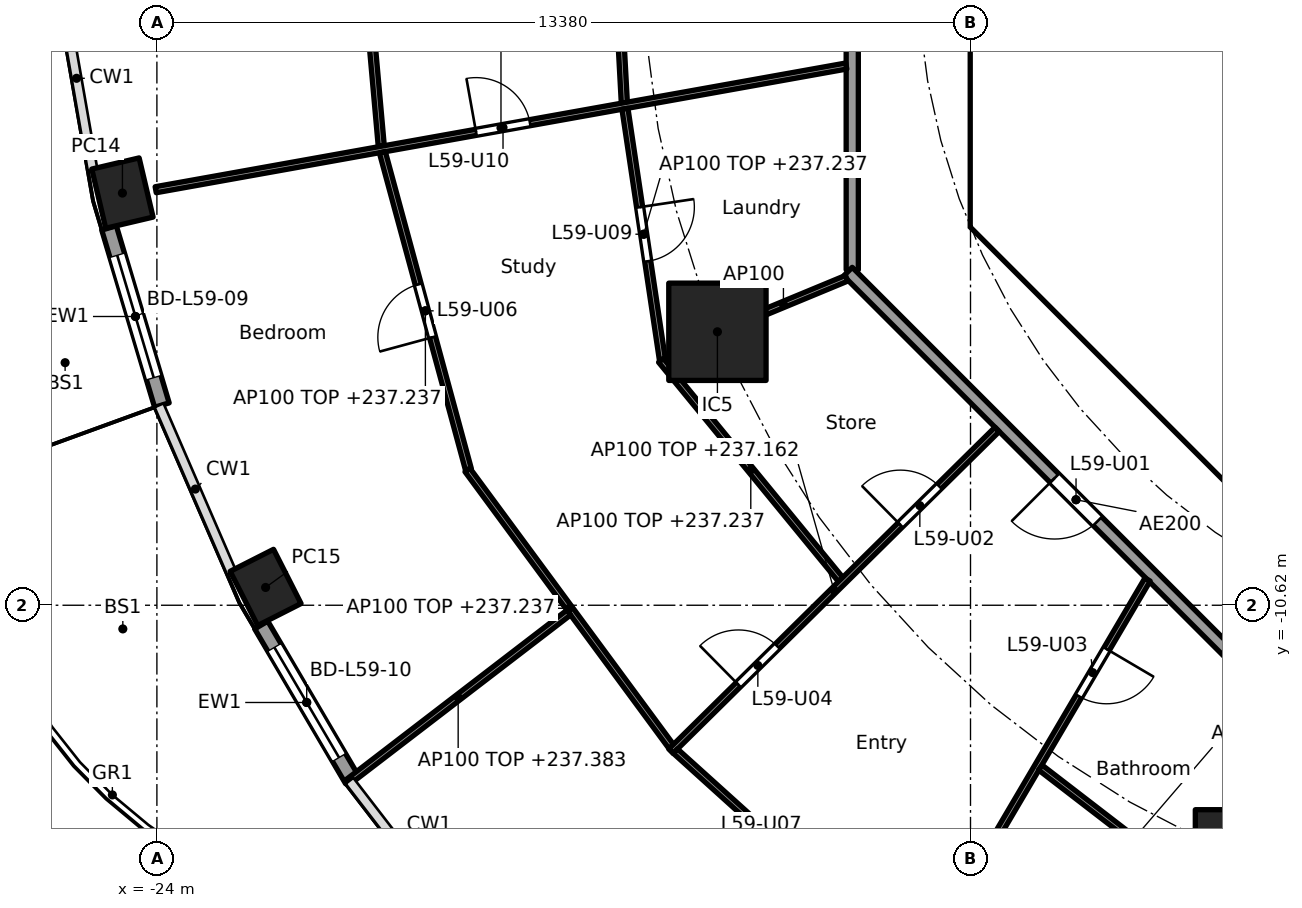
"""IFC4 building model, lengths in metres.
Left out: names, types, materials, properties, quantities, classifications, styles, units other than length and angle.
Written with IfcOpenShell. Run it as: python <this file> out.ifc"""

import sys

from ifc_helpers import new_model, si_unit, direction, frame, frame_2d, origin, origin_2d, place, context, subcontext, project, spatial, polyline, rectangle, hollow_rectangle, outline, extrude, element, fill, save


model = new_model("IFC4")
c1 = context("Model", 3, precision=1e-05, world=origin(), true_north=direction((0.0, 1.0)))
c2 = subcontext(c1, "Body", "Model", "MODEL_VIEW")
j1 = project(units=[si_unit("LENGTHUNIT", "METRE"), si_unit("PLANEANGLEUNIT", "RADIAN")], contexts=[c1])
p1 = place(None, origin())
s1 = spatial("IfcSite", under=j1, at=p1, CompositionType="ELEMENT")
p2 = place(p1, origin())
s2 = spatial("IfcBuilding", under=s1, at=p2, CompositionType="ELEMENT")
p3 = place(p2, frame((0.0, 0.0, 234.4)))
s3 = spatial("IfcBuildingStorey", under=s2, at=p3, CompositionType="ELEMENT", Elevation=234.4)
for number, where, z_axis, x_axis in (
    (1, (-24.567, -3.842, 0.0), (0.0, 0.0, 1.0), (0.229, -0.973, 0.0)),
    (2, (-22.212, -10.327, 0.0), (0.0, 0.0, 1.0), (0.452, -0.892, 0.0)),
):
    element("IfcColumn", number, at=place(p3, frame(where, z_axis=z_axis, x_axis=x_axis)), inside=s3, PredefinedType="COLUMN", context=c2, shape_type="SweptSolid", body=[
        extrude(hollow_rectangle(XDim=1.0, YDim=0.8, WallThickness=0.032, at=origin_2d()), origin(), (0.0, 0.0, 1.0), 3.7),
    ])
for number, where, z_axis, x_axis in (
    (3, (-14.782, -6.123, 0.0), (0.0, 0.0, 1.0), (1.0, 0.0, 0.0)),
    (4, (-6.123, -14.782, 0.0), (0.0, 0.0, 1.0), (1.0, 0.0, 0.0)),
):
    element("IfcColumn", number, at=place(p3, frame(where, z_axis=z_axis, x_axis=x_axis)), inside=s3, PredefinedType="COLUMN", context=c2, shape_type="SweptSolid", body=[
        extrude(rectangle(XDim=1.6, YDim=1.6, at=origin_2d()), origin(), (0.0, 0.0, 1.0), 3.7),
    ])
p4 = place(p3, frame((-23.918, -7.328, 0.0), z_axis=(0.0, 0.0, 1.0), x_axis=(-0.285859454825, 0.95827155446, 0.0)))
e5 = element("IfcWall", 5, at=p4, inside=s3, PredefinedType="SOLIDWALL", context=c2, shape_type="SweptSolid", body=[
    extrude(rectangle(XDim=3.041, YDim=0.25, at=frame_2d((1.52, 0.0))), origin(), (0.0, 0.0, 1.0), 3.44),
])
p5 = place(p4, frame((0.47, 0.0, 0.0)))
e6 = element("IfcOpeningElement", 6, at=p5, cuts=e5, PredefinedType="OPENING", context=c2, shape_type="SweptSolid", body=[
    extrude(rectangle(XDim=2.1, YDim=2.4, at=frame_2d((1.05, 1.2))), frame((0.0, 0.135, 0.0), z_axis=(0.0, -1.0, 0.0), x_axis=(1.0, 0.0, 0.0)), (0.0, 0.0, 1.0), 0.27),
])
p6 = place(p3, frame((-20.788, -13.493, 0.0), z_axis=(0.0, 0.0, 1.0), x_axis=(-0.506294090973, 0.862360883532, 0.0)))
e7 = element("IfcWall", 7, at=p6, inside=s3, PredefinedType="SOLIDWALL", context=c2, shape_type="SweptSolid", body=[
    extrude(rectangle(XDim=2.955, YDim=0.25, at=frame_2d((1.477, 0.0))), origin(), (0.0, 0.0, 1.0), 3.44),
])
p7 = place(p6, frame((0.427, 0.0, 0.0)))
e8 = element("IfcOpeningElement", 8, at=p7, cuts=e7, PredefinedType="OPENING", context=c2, shape_type="SweptSolid", body=[
    extrude(rectangle(XDim=2.1, YDim=2.4, at=frame_2d((1.05, 1.2))), frame((0.0, 0.135, 0.0), z_axis=(0.0, -1.0, 0.0), x_axis=(1.0, 0.0, 0.0)), (0.0, 0.0, 1.0), 0.27),
])
p8 = place(p3, frame((-10.325, 3.801, 0.0), z_axis=(0.0, 0.0, 1.0), x_axis=(0.0, -1.0, 0.0)))
e9 = element("IfcWall", 9, at=p8, inside=s3, PredefinedType="SHEAR", context=c2, shape_type="SweptSolid", body=[
    extrude(rectangle(XDim=7.602, YDim=0.6, at=frame_2d((3.801, 0.0))), origin(), (0.0, 0.0, 1.0), 3.44),
])
p9 = place(p8, frame((0.651, 0.0, 0.0)))
e10 = element("IfcOpeningElement", 10, at=p9, cuts=e9, PredefinedType="OPENING", context=c2, shape_type="SweptSolid", body=[
    extrude(rectangle(XDim=1.5, YDim=2.1, at=frame_2d((0.75, 1.05))), frame((0.0, 0.31, 0.0), z_axis=(0.0, -1.0, 0.0), x_axis=(1.0, 0.0, 0.0)), (0.0, 0.0, 1.0), 0.62),
])
p10 = place(p8, frame((5.451, 0.0, 0.0)))
e11 = element("IfcOpeningElement", 11, at=p10, cuts=e9, PredefinedType="OPENING", context=c2, shape_type="SweptSolid", body=[
    extrude(rectangle(XDim=1.5, YDim=2.1, at=frame_2d((0.75, 1.05))), frame((0.0, 0.31, 0.0), z_axis=(0.0, -1.0, 0.0), x_axis=(1.0, 0.0, 0.0)), (0.0, 0.0, 1.0), 0.62),
])
p11 = place(p3, frame((-9.988, -4.613, 0.0), z_axis=(0.0, 0.0, 1.0), x_axis=(0.707106781187, -0.707106781187, 0.0)))
e12 = element("IfcWall", 12, at=p11, inside=s3, PredefinedType="SHEAR", context=c2, shape_type="SweptSolid", body=[
    extrude(rectangle(XDim=7.602, YDim=0.6, at=frame_2d((3.801, 0.0))), origin(), (0.0, 0.0, 1.0), 3.44),
])
p12 = place(p11, frame((6.151, 0.0, 0.0)))
e13 = element("IfcOpeningElement", 13, at=p12, cuts=e12, PredefinedType="OPENING", context=c2, shape_type="SweptSolid", body=[
    extrude(rectangle(XDim=1.1, YDim=2.1, at=frame_2d((0.55, 1.05))), frame((0.0, 0.31, 0.0), z_axis=(0.0, -1.0, 0.0), x_axis=(1.0, 0.0, 0.0)), (0.0, 0.0, 1.0), 0.62),
])
p13 = place(p3, frame((-7.4, -6.627, 0.0), z_axis=(0.0, 0.0, 1.0), x_axis=(0.0, 1.0, 0.0)))
e14 = element("IfcWall", 14, at=p13, inside=s3, PredefinedType="PARTITIONING", context=c2, shape_type="SweptSolid", body=[
    extrude(rectangle(XDim=2.527, YDim=0.15, at=frame_2d((1.263, 0.0))), origin(), (0.0, 0.0, 1.0), 3.44),
])
p14 = place(p13, frame((0.776, 0.0, 0.0)))
e15 = element("IfcOpeningElement", 15, at=p14, cuts=e14, PredefinedType="OPENING", context=c2, shape_type="SweptSolid", body=[
    extrude(rectangle(XDim=0.9, YDim=2.1, at=frame_2d((0.45, 1.05))), frame((0.0, 0.085, 0.0), z_axis=(0.0, -1.0, 0.0), x_axis=(1.0, 0.0, 0.0)), (0.0, 0.0, 1.0), 0.17),
])
p15 = place(p3, frame((-6.7, -2.0, 0.0), z_axis=(0.0, 0.0, 1.0), x_axis=(1.0, 0.0, 0.0)))
e16 = element("IfcWall", 16, at=p15, inside=s3, PredefinedType="SOLIDWALL", context=c2, shape_type="SweptSolid", body=[
    extrude(rectangle(XDim=13.4, YDim=0.2, at=frame_2d((6.7, 0.0))), origin(), (0.0, 0.0, 1.0), 3.44),
])
p16 = place(p15, frame((5.05, 0.0, 0.0)))
e17 = element("IfcOpeningElement", 17, at=p16, cuts=e16, PredefinedType="OPENING", context=c2, shape_type="SweptSolid", body=[
    extrude(rectangle(XDim=1.1, YDim=2.1, at=frame_2d((0.55, 1.05))), frame((0.0, 0.11, 0.0), z_axis=(0.0, -1.0, 0.0), x_axis=(1.0, 0.0, 0.0)), (0.0, 0.0, 1.0), 0.22),
])
p17 = place(p15, frame((7.25, 0.0, 0.0)))
e18 = element("IfcOpeningElement", 18, at=p17, cuts=e16, PredefinedType="OPENING", context=c2, shape_type="SweptSolid", body=[
    extrude(rectangle(XDim=1.1, YDim=2.1, at=frame_2d((0.55, 1.05))), frame((0.0, 0.11, 0.0), z_axis=(0.0, -1.0, 0.0), x_axis=(1.0, 0.0, 0.0)), (0.0, 0.0, 1.0), 0.22),
])
p18 = place(p15, frame((0.75, 0.0, 0.0)))
e19 = element("IfcOpeningElement", 19, at=p18, cuts=e16, PredefinedType="OPENING", context=c2, shape_type="SweptSolid", body=[
    extrude(rectangle(XDim=0.9, YDim=2.1, at=frame_2d((0.45, 1.05))), frame((0.0, 0.11, 0.0), z_axis=(0.0, -1.0, 0.0), x_axis=(1.0, 0.0, 0.0)), (0.0, 0.0, 1.0), 0.22),
])
p19 = place(p15, frame((2.95, 0.0, 0.0)))
e20 = element("IfcOpeningElement", 20, at=p19, cuts=e16, PredefinedType="OPENING", context=c2, shape_type="SweptSolid", body=[
    extrude(rectangle(XDim=0.9, YDim=2.1, at=frame_2d((0.45, 1.05))), frame((0.0, 0.11, 0.0), z_axis=(0.0, -1.0, 0.0), x_axis=(1.0, 0.0, 0.0)), (0.0, 0.0, 1.0), 0.22),
])
p20 = place(p3, origin())
e21 = element("IfcWall", 21, at=p20, inside=s3, PredefinedType="SHEAR", context=c2, shape_type="SweptSolid", body=[
    extrude(outline(polyline([(-10.625, -3.801), (-10.025, -3.801), (-10.025, -4.152), (-9.776, -4.401), (-10.2, -4.825), (-10.625, -4.401), (-10.625, -3.801)])), origin(), (0.0, 0.0, 1.0), 3.44),
])
p21 = place(p3, origin())
e22 = element("IfcWall", 22, at=p21, inside=s3, PredefinedType="SOLIDWALL", context=c2, shape_type="SweptSolid", body=[
    extrude(outline(polyline([(-6.7, -2.1), (-6.5, -2.1), (-6.5, -4.1), (-4.5, -4.1), (-4.5, -2.1), (-4.3, -2.1), (-4.3, -4.1), (-2.3, -4.1), (-2.3, -2.1), (-2.1, -2.1), (-2.1, -4.1), (-0.1, -4.1), (-0.1, -2.1), (0.1, -2.1), (0.1, -4.1), (2.1, -4.1), (2.1, -2.1), (2.3, -2.1), (2.3, -4.1), (4.3, -4.1), (4.3, -2.1), (4.5, -2.1), (4.5, -4.1), (6.5, -4.1), (6.5, -2.1), (6.7, -2.1), (6.7, -4.3), (-6.7, -4.3), (-6.7, -2.1)])), origin(), (0.0, 0.0, 1.0), 3.44),
])
p22 = place(p3, frame((-10.025, -4.0, 0.0), z_axis=(0.0, 0.0, 1.0), x_axis=(1.0, 0.0, 0.0)))
e23 = element("IfcWall", 23, at=p22, inside=s3, PredefinedType="PARTITIONING", context=c2, shape_type="SweptSolid", body=[
    extrude(rectangle(XDim=3.325, YDim=0.2, at=frame_2d((1.662, 0.0))), origin(), (0.0, 0.0, 1.0), 3.44),
])
p23 = place(p3, frame((-12.565, 5.304, 0.0), z_axis=(0.0, 0.0, 1.0), x_axis=(0.0, -1.0, 0.0)))
e24 = element("IfcWall", 24, at=p23, inside=s3, PredefinedType="PARTITIONING", context=c2, shape_type="SweptSolid", body=[
    extrude(rectangle(XDim=10.409, YDim=0.2, at=frame_2d((5.205, 0.0))), origin(), (0.0, 0.0, 1.0), 3.44),
])
p24 = place(p3, frame((-12.635, -5.134, 0.0), z_axis=(0.0, 0.0, 1.0), x_axis=(0.707106781187, -0.707106781187, 0.0)))
e25 = element("IfcWall", 25, at=p24, inside=s3, PredefinedType="PARTITIONING", context=c2, shape_type="SweptSolid", body=[
    extrude(rectangle(XDim=10.609, YDim=0.2, at=frame_2d((5.305, 0.0))), origin(), (0.0, 0.0, 1.0), 3.44),
])
p25 = place(p24, frame((4.804, 0.0, 0.0)))
e26 = element("IfcOpeningElement", 26, at=p25, cuts=e25, PredefinedType="OPENING", context=c2, shape_type="SweptSolid", body=[
    extrude(rectangle(XDim=1.0, YDim=2.1, at=frame_2d((0.5, 1.05))), frame((0.0, 0.11, 0.0), z_axis=(0.0, -1.0, 0.0), x_axis=(1.0, 0.0, 0.0)), (0.0, 0.0, 1.0), 0.22),
])
p26 = place(p3, frame((-16.554, 2.1, 0.0), z_axis=(0.0, 0.0, 1.0), x_axis=(0.053945770239, -0.998543866775, 0.0)))
e27 = element("IfcWall", 27, at=p26, inside=s3, PredefinedType="PARTITIONING", context=c2, shape_type="SweptSolid", body=[
    extrude(rectangle(XDim=4.462, YDim=0.1, at=frame_2d((2.231, 0.0))), origin(), (0.0, 0.0, 1.0), 2.837),
])
p27 = place(p3, frame((-20.81, 2.542, 0.0), z_axis=(0.0, 0.0, 1.0), x_axis=(0.088621920298, -0.996065336834, 0.0)))
e28 = element("IfcWall", 28, at=p27, inside=s3, PredefinedType="PARTITIONING", context=c2, shape_type="SweptSolid", body=[
    extrude(rectangle(XDim=5.636, YDim=0.1, at=frame_2d((2.818, 0.0))), origin(), (0.0, 0.0, 1.0), 2.837),
])
p28 = place(p3, frame((-12.663, -1.752, 0.0), z_axis=(0.0, 0.0, 1.0), x_axis=(-0.98433012022, -0.176335516635, 0.0)))
e29 = element("IfcWall", 29, at=p28, inside=s3, PredefinedType="PARTITIONING", context=c2, shape_type="SweptSolid", body=[
    extrude(rectangle(XDim=11.537, YDim=0.1, at=frame_2d((5.769, 0.0))), origin(), (0.0, 0.0, 1.0), 2.762),
])
p29 = place(p28, frame((5.285, 0.0, 0.0)))
e30 = element("IfcOpeningElement", 30, at=p29, cuts=e29, PredefinedType="OPENING", context=c2, shape_type="SweptSolid", body=[
    extrude(rectangle(XDim=0.9, YDim=2.1, at=frame_2d((0.45, 1.05))), frame((0.0, 0.06, 0.0), z_axis=(0.0, -1.0, 0.0), x_axis=(1.0, 0.0, 0.0)), (0.0, 0.0, 1.0), 0.12),
])
p30 = place(p3, frame((-16.303, -2.455, 0.0), z_axis=(0.0, 0.0, 1.0), x_axis=(0.14769374353, -0.989033143086, 0.0)))
e31 = element("IfcWall", 31, at=p30, inside=s3, PredefinedType="PARTITIONING", context=c2, shape_type="SweptSolid", body=[
    extrude(rectangle(XDim=4.172, YDim=0.1, at=frame_2d((2.086, 0.0))), origin(), (0.0, 0.0, 1.0), 2.837),
])
p31 = place(p30, frame((1.636, 0.0, 0.0)))
e32 = element("IfcOpeningElement", 32, at=p31, cuts=e31, PredefinedType="OPENING", context=c2, shape_type="SweptSolid", body=[
    extrude(rectangle(XDim=0.9, YDim=2.1, at=frame_2d((0.45, 1.05))), frame((0.0, 0.06, 0.0), z_axis=(0.0, -1.0, 0.0), x_axis=(1.0, 0.0, 0.0)), (0.0, 0.0, 1.0), 0.12),
])
p32 = place(p3, frame((-20.292, -3.17, 0.0), z_axis=(0.0, 0.0, 1.0), x_axis=(0.261890541964, -0.965097582646, 0.0)))
e33 = element("IfcWall", 33, at=p32, inside=s3, PredefinedType="PARTITIONING", context=c2, shape_type="SweptSolid", body=[
    extrude(rectangle(XDim=5.406, YDim=0.1, at=frame_2d((2.703, 0.0))), origin(), (0.0, 0.0, 1.0), 2.837),
])
p33 = place(p32, frame((2.253, 0.0, 0.0)))
e34 = element("IfcOpeningElement", 34, at=p33, cuts=e33, PredefinedType="OPENING", context=c2, shape_type="SweptSolid", body=[
    extrude(rectangle(XDim=0.9, YDim=2.1, at=frame_2d((0.45, 1.05))), frame((0.0, 0.06, 0.0), z_axis=(0.0, -1.0, 0.0), x_axis=(1.0, 0.0, 0.0)), (0.0, 0.0, 1.0), 0.12),
])
p34 = place(p3, frame((-12.657, -5.243, 0.0), z_axis=(0.0, 0.0, 1.0), x_axis=(-0.923864733477, -0.382719158442, 0.0)))
e35 = element("IfcWall", 35, at=p34, inside=s3, PredefinedType="PARTITIONING", context=c2, shape_type="SweptSolid", body=[
    extrude(rectangle(XDim=2.25, YDim=0.1, at=frame_2d((1.125, 0.0))), origin(), (0.0, 0.0, 1.0), 3.44),
])
p35 = place(p3, frame((-15.711, -6.593, 0.0), z_axis=(0.0, 0.0, 1.0), x_axis=(0.634058916642, -0.773284740718, 0.0)))
e36 = element("IfcWall", 36, at=p35, inside=s3, PredefinedType="PARTITIONING", context=c2, shape_type="SweptSolid", body=[
    extrude(rectangle(XDim=4.661, YDim=0.1, at=frame_2d((2.331, 0.0))), origin(), (0.0, 0.0, 1.0), 2.837),
])
p36 = place(p3, frame((-18.893, -8.395, 0.0), z_axis=(0.0, 0.0, 1.0), x_axis=(0.593212299255, -0.80504606577, 0.0)))
e37 = element("IfcWall", 37, at=p36, inside=s3, PredefinedType="PARTITIONING", context=c2, shape_type="SweptSolid", body=[
    extrude(rectangle(XDim=5.652, YDim=0.1, at=frame_2d((2.826, 0.0))), origin(), (0.0, 0.0, 1.0), 2.837),
])
p37 = place(p3, frame((-17.227, -10.74, 0.0), z_axis=(0.0, 0.0, 1.0), x_axis=(-0.793312316411, -0.60881488864, 0.0)))
e38 = element("IfcWall", 38, at=p37, inside=s3, PredefinedType="PARTITIONING", context=c2, shape_type="SweptSolid", body=[
    extrude(rectangle(XDim=4.585, YDim=0.1, at=frame_2d((2.292, 0.0))), origin(), (0.0, 0.0, 1.0), 2.983),
])
p38 = place(p3, frame((-10.183, -7.728, 0.0), z_axis=(0.0, 0.0, 1.0), x_axis=(-0.711869910979, -0.702311348223, 0.0)))
e39 = element("IfcWall", 39, at=p38, inside=s3, PredefinedType="PARTITIONING", context=c2, shape_type="SweptSolid", body=[
    extrude(rectangle(XDim=7.535, YDim=0.1, at=frame_2d((3.767, 0.0))), origin(), (0.0, 0.0, 1.0), 2.762),
])
p39 = place(p38, frame((1.335, 0.0, 0.0)))
e40 = element("IfcOpeningElement", 40, at=p39, cuts=e39, PredefinedType="OPENING", context=c2, shape_type="SweptSolid", body=[
    extrude(rectangle(XDim=0.9, YDim=2.1, at=frame_2d((0.45, 1.05))), frame((0.0, 0.06, 0.0), z_axis=(0.0, -1.0, 0.0), x_axis=(1.0, 0.0, 0.0)), (0.0, 0.0, 1.0), 0.12),
])
p40 = place(p38, frame((5.077, 0.0, 0.0)))
e41 = element("IfcOpeningElement", 41, at=p40, cuts=e39, PredefinedType="OPENING", context=c2, shape_type="SweptSolid", body=[
    extrude(rectangle(XDim=0.9, YDim=2.1, at=frame_2d((0.45, 1.05))), frame((0.0, 0.06, 0.0), z_axis=(0.0, -1.0, 0.0), x_axis=(1.0, 0.0, 0.0)), (0.0, 0.0, 1.0), 0.12),
])
p41 = place(p3, frame((-15.474, -13.019, 0.0), z_axis=(0.0, 0.0, 1.0), x_axis=(0.742348572616, -0.670013878017, 0.0)))
e42 = element("IfcWall", 42, at=p41, inside=s3, PredefinedType="PARTITIONING", context=c2, shape_type="SweptSolid", body=[
    extrude(rectangle(XDim=5.319, YDim=0.1, at=frame_2d((2.66, 0.0))), origin(), (0.0, 0.0, 1.0), 2.837),
])
p42 = place(p41, frame((2.21, 0.0, 0.0)))
e43 = element("IfcOpeningElement", 43, at=p42, cuts=e42, PredefinedType="OPENING", context=c2, shape_type="SweptSolid", body=[
    extrude(rectangle(XDim=0.9, YDim=2.1, at=frame_2d((0.45, 1.05))), frame((0.0, 0.06, 0.0), z_axis=(0.0, -1.0, 0.0), x_axis=(1.0, 0.0, 0.0)), (0.0, 0.0, 1.0), 0.12),
])
p43 = place(p3, frame((-7.709, -10.198, 0.0), z_axis=(0.0, 0.0, 1.0), x_axis=(-0.507355901053, -0.8617366127, 0.0)))
e44 = element("IfcWall", 44, at=p43, inside=s3, PredefinedType="PARTITIONING", context=c2, shape_type="SweptSolid", body=[
    extrude(rectangle(XDim=11.025, YDim=0.1, at=frame_2d((5.512, 0.0))), origin(), (0.0, 0.0, 1.0), 2.762),
])
p44 = place(p43, frame((1.326, 0.0, 0.0)))
e45 = element("IfcOpeningElement", 45, at=p44, cuts=e44, PredefinedType="OPENING", context=c2, shape_type="SweptSolid", body=[
    extrude(rectangle(XDim=0.9, YDim=2.1, at=frame_2d((0.45, 1.05))), frame((0.0, 0.06, 0.0), z_axis=(0.0, -1.0, 0.0), x_axis=(1.0, 0.0, 0.0)), (0.0, 0.0, 1.0), 0.12),
])
p45 = place(p43, frame((5.05, 0.0, 0.0)))
e46 = element("IfcOpeningElement", 46, at=p45, cuts=e44, PredefinedType="OPENING", context=c2, shape_type="SweptSolid", body=[
    extrude(rectangle(XDim=0.9, YDim=2.1, at=frame_2d((0.45, 1.05))), frame((0.0, 0.06, 0.0), z_axis=(0.0, -1.0, 0.0), x_axis=(1.0, 0.0, 0.0)), (0.0, 0.0, 1.0), 0.12),
])
p46 = place(p43, frame((8.787, 0.0, 0.0)))
e47 = element("IfcOpeningElement", 47, at=p46, cuts=e44, PredefinedType="OPENING", context=c2, shape_type="SweptSolid", body=[
    extrude(rectangle(XDim=0.9, YDim=2.1, at=frame_2d((0.45, 1.05))), frame((0.0, 0.06, 0.0), z_axis=(0.0, -1.0, 0.0), x_axis=(1.0, 0.0, 0.0)), (0.0, 0.0, 1.0), 0.12),
])
p47 = place(p3, frame((-9.471, -13.289, 0.0), z_axis=(0.0, 0.0, 1.0), x_axis=(0.792227074489, -0.610226402614, 0.0)))
e48 = element("IfcWall", 48, at=p47, inside=s3, PredefinedType="PARTITIONING", context=c2, shape_type="SweptSolid", body=[
    extrude(rectangle(XDim=3.866, YDim=0.1, at=frame_2d((1.933, 0.0))), origin(), (0.0, 0.0, 1.0), 2.837),
])
p48 = place(p5, origin())
e49 = element("IfcDoor", 49, at=p48, inside=s3, OperationType="SLIDING_TO_LEFT", PredefinedType="DOOR", context=c2, shape_type="SweptSolid", body=[
    extrude(rectangle(XDim=2.1, YDim=2.4, at=frame_2d((1.05, 1.2))), frame((0.0, 0.025, 0.0), z_axis=(0.0, -1.0, 0.0), x_axis=(1.0, 0.0, 0.0)), (0.0, 0.0, 1.0), 0.05),
])
fill(e6, e49)
p49 = place(p7, origin())
e50 = element("IfcDoor", 50, at=p49, inside=s3, OperationType="SLIDING_TO_LEFT", PredefinedType="DOOR", context=c2, shape_type="SweptSolid", body=[
    extrude(rectangle(XDim=2.1, YDim=2.4, at=frame_2d((1.05, 1.2))), frame((0.0, 0.025, 0.0), z_axis=(0.0, -1.0, 0.0), x_axis=(1.0, 0.0, 0.0)), (0.0, 0.0, 1.0), 0.05),
])
fill(e8, e50)
p50 = place(p14, origin())
e51 = element("IfcDoor", 51, at=p50, inside=s3, OperationType="SINGLE_SWING_LEFT", PredefinedType="DOOR", context=c2, shape_type="SweptSolid", body=[
    extrude(rectangle(XDim=0.9, YDim=2.1, at=frame_2d((0.45, 1.05))), frame((0.0, 0.025, 0.0), z_axis=(0.0, -1.0, 0.0), x_axis=(1.0, 0.0, 0.0)), (0.0, 0.0, 1.0), 0.05),
])
fill(e15, e51)
p51 = place(p10, origin())
e52 = element("IfcDoor", 52, at=p51, inside=s3, OperationType="DOUBLE_DOOR_SINGLE_SWING", PredefinedType="DOOR", context=c2, shape_type="SweptSolid", body=[
    extrude(rectangle(XDim=1.5, YDim=2.1, at=frame_2d((0.75, 1.05))), frame((0.0, 0.025, 0.0), z_axis=(0.0, -1.0, 0.0), x_axis=(1.0, 0.0, 0.0)), (0.0, 0.0, 1.0), 0.05),
])
fill(e11, e52)
p52 = place(p25, frame((1.0, 0.0, 0.0), x_axis=(-1.0, 0.0, 0.0)))
e53 = element("IfcDoor", 53, at=p52, inside=s3, OperationType="SINGLE_SWING_RIGHT", PredefinedType="DOOR", context=c2, shape_type="SweptSolid", body=[
    extrude(rectangle(XDim=1.0, YDim=2.1, at=frame_2d((0.5, 1.05))), frame((0.0, 0.025, 0.0), z_axis=(0.0, -1.0, 0.0), x_axis=(1.0, 0.0, 0.0)), (0.0, 0.0, 1.0), 0.05),
])
fill(e26, e53)
p53 = place(p39, frame((0.9, 0.0, 0.0), x_axis=(-1.0, 0.0, 0.0)))
e54 = element("IfcDoor", 54, at=p53, inside=s3, OperationType="SINGLE_SWING_LEFT", PredefinedType="DOOR", context=c2, shape_type="SweptSolid", body=[
    extrude(rectangle(XDim=0.9, YDim=2.1, at=frame_2d((0.45, 1.05))), frame((0.0, 0.025, 0.0), z_axis=(0.0, -1.0, 0.0), x_axis=(1.0, 0.0, 0.0)), (0.0, 0.0, 1.0), 0.05),
])
fill(e40, e54)
p54 = place(p44, origin())
e55 = element("IfcDoor", 55, at=p54, inside=s3, OperationType="SINGLE_SWING_LEFT", PredefinedType="DOOR", context=c2, shape_type="SweptSolid", body=[
    extrude(rectangle(XDim=0.9, YDim=2.1, at=frame_2d((0.45, 1.05))), frame((0.0, 0.025, 0.0), z_axis=(0.0, -1.0, 0.0), x_axis=(1.0, 0.0, 0.0)), (0.0, 0.0, 1.0), 0.05),
])
fill(e45, e55)
p55 = place(p40, frame((0.9, 0.0, 0.0), x_axis=(-1.0, 0.0, 0.0)))
e56 = element("IfcDoor", 56, at=p55, inside=s3, OperationType="SINGLE_SWING_LEFT", PredefinedType="DOOR", context=c2, shape_type="SweptSolid", body=[
    extrude(rectangle(XDim=0.9, YDim=2.1, at=frame_2d((0.45, 1.05))), frame((0.0, 0.025, 0.0), z_axis=(0.0, -1.0, 0.0), x_axis=(1.0, 0.0, 0.0)), (0.0, 0.0, 1.0), 0.05),
])
fill(e41, e56)
p56 = place(p33, frame((0.9, 0.0, 0.0), x_axis=(-1.0, 0.0, 0.0)))
e57 = element("IfcDoor", 57, at=p56, inside=s3, OperationType="SINGLE_SWING_LEFT", PredefinedType="DOOR", context=c2, shape_type="SweptSolid", body=[
    extrude(rectangle(XDim=0.9, YDim=2.1, at=frame_2d((0.45, 1.05))), frame((0.0, 0.025, 0.0), z_axis=(0.0, -1.0, 0.0), x_axis=(1.0, 0.0, 0.0)), (0.0, 0.0, 1.0), 0.05),
])
fill(e34, e57)
p57 = place(p31, origin())
e58 = element("IfcDoor", 58, at=p57, inside=s3, OperationType="SINGLE_SWING_LEFT", PredefinedType="DOOR", context=c2, shape_type="SweptSolid", body=[
    extrude(rectangle(XDim=0.9, YDim=2.1, at=frame_2d((0.45, 1.05))), frame((0.0, 0.025, 0.0), z_axis=(0.0, -1.0, 0.0), x_axis=(1.0, 0.0, 0.0)), (0.0, 0.0, 1.0), 0.05),
])
fill(e32, e58)
p58 = place(p29, frame((0.9, 0.0, 0.0), x_axis=(-1.0, 0.0, 0.0)))
e59 = element("IfcDoor", 59, at=p58, inside=s3, OperationType="SINGLE_SWING_LEFT", PredefinedType="DOOR", context=c2, shape_type="SweptSolid", body=[
    extrude(rectangle(XDim=0.9, YDim=2.1, at=frame_2d((0.45, 1.05))), frame((0.0, 0.025, 0.0), z_axis=(0.0, -1.0, 0.0), x_axis=(1.0, 0.0, 0.0)), (0.0, 0.0, 1.0), 0.05),
])
fill(e30, e59)
save(model, sys.argv[1])
